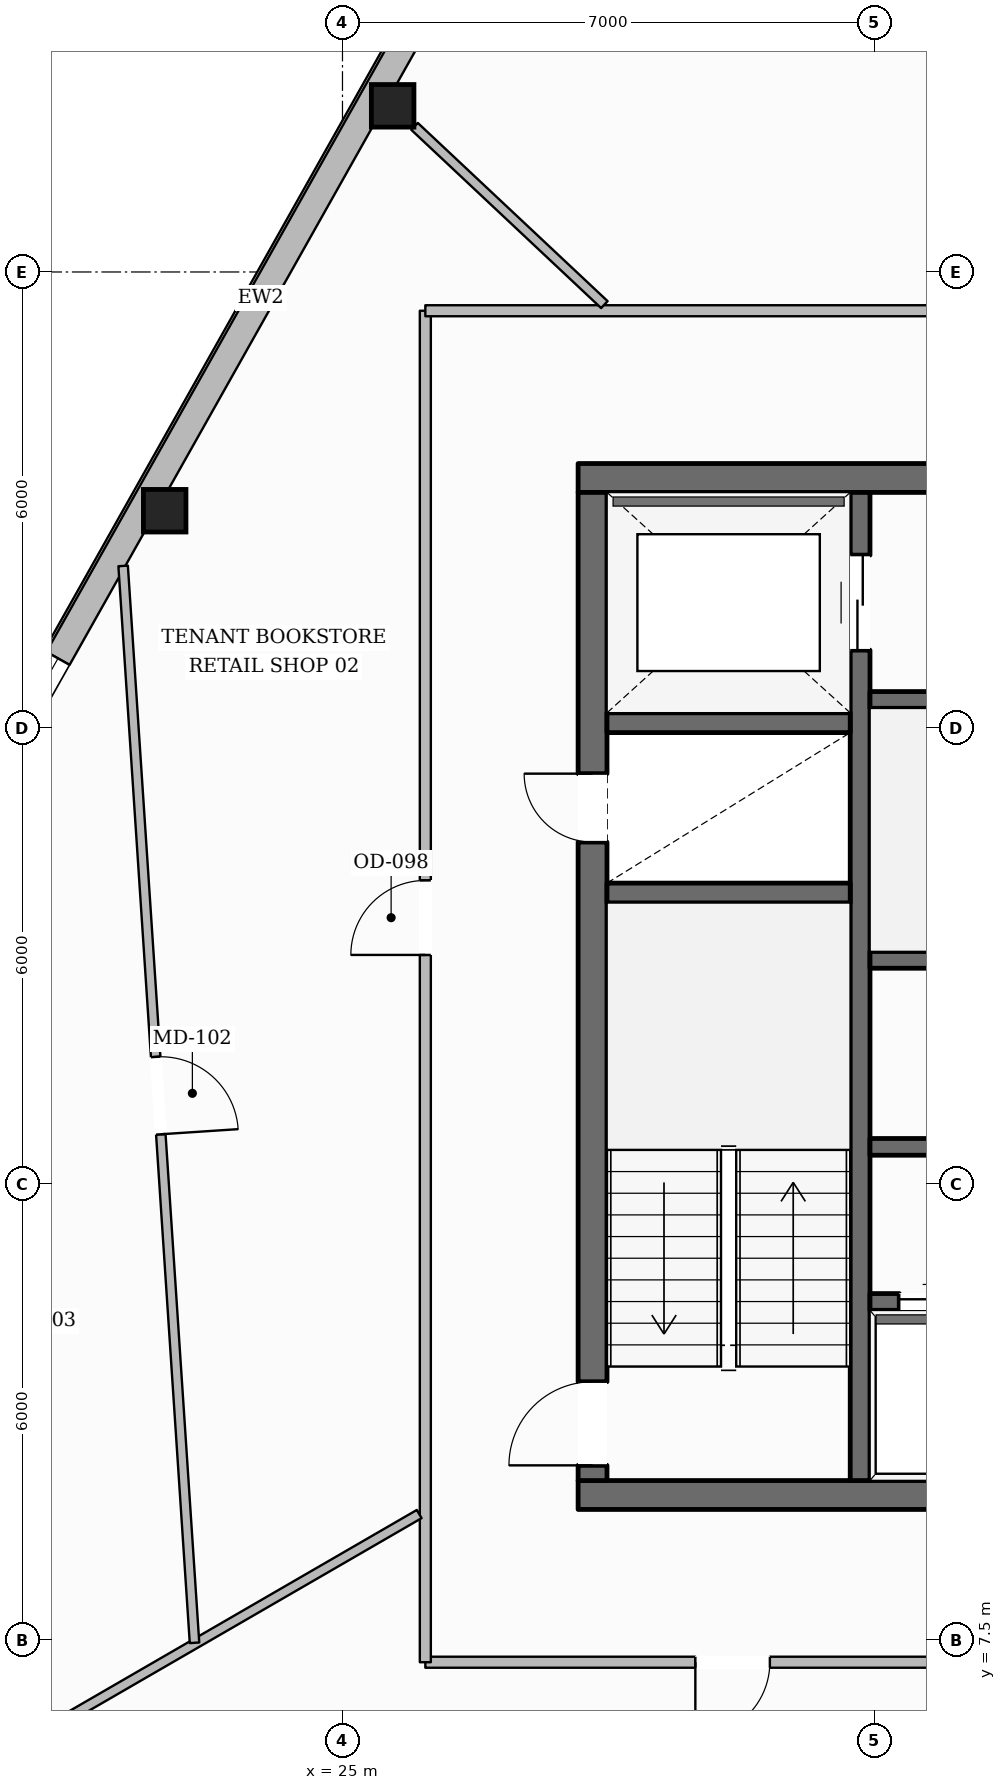
"""IFC4 building model, lengths in metres.
Left out: names, types, materials, properties, quantities, classifications, styles, units other than length and angle.
Written with IfcOpenShell. Run it as: python <this file> out.ifc"""

import sys

from ifc_helpers import new_model, si_unit, direction, frame, frame_2d, origin, origin_2d, place, context, subcontext, project, spatial, rectangle, hollow_rectangle, extrude, element, fill, save


model = new_model("IFC4")
c1 = context("Model", 3, precision=1e-05, world=origin(), true_north=direction((0.0, 1.0)))
c2 = subcontext(c1, "Body", "Model", "MODEL_VIEW")
j1 = project(units=[si_unit("LENGTHUNIT", "METRE"), si_unit("PLANEANGLEUNIT", "RADIAN")], contexts=[c1])
p1 = place(None, origin())
s1 = spatial("IfcSite", under=j1, at=p1, CompositionType="ELEMENT")
p2 = place(p1, origin())
s2 = spatial("IfcBuilding", under=s1, at=p2, CompositionType="ELEMENT")
p3 = place(p2, frame((0.0, 0.0, 239.5)))
s3 = spatial("IfcBuildingStorey", under=s2, at=p3, CompositionType="ELEMENT", Elevation=239.5)
p4 = place(p3, frame((28.1, 9.41, 0.0), z_axis=(0.0, 0.0, 1.0), x_axis=(1.0, 0.0, 0.0)))
e1 = element("IfcWall", 1, at=p4, inside=s3, PredefinedType="SOLIDWALL", context=c2, shape_type="SweptSolid", body=[
    extrude(rectangle(XDim=19.8, YDim=0.38, at=frame_2d((9.9, 0.0))), origin(), (0.0, 0.0, 1.0), 3.61),
])
p5 = place(p4, frame((10.4, 0.0, 0.0)))
e2 = element("IfcOpeningElement", 2, at=p5, cuts=e1, PredefinedType="OPENING", context=c2, shape_type="SweptSolid", body=[
    extrude(rectangle(XDim=1.4, YDim=2.2, at=frame_2d((0.7, 1.1))), frame((0.0, 0.2, 0.0), z_axis=(0.0, -1.0, 0.0), x_axis=(1.0, 0.0, 0.0)), (0.0, 0.0, 1.0), 0.4),
])
p6 = place(p3, frame((28.1, 22.79, 0.0), z_axis=(0.0, 0.0, 1.0), x_axis=(1.0, 0.0, 0.0)))
e3 = element("IfcWall", 3, at=p6, inside=s3, PredefinedType="SOLIDWALL", context=c2, shape_type="SweptSolid", body=[
    extrude(rectangle(XDim=19.8, YDim=0.38, at=frame_2d((9.9, 0.0))), origin(), (0.0, 0.0, 1.0), 3.61),
])
p7 = place(p6, frame((6.175, 0.0, 0.0)))
e4 = element("IfcOpeningElement", 4, at=p7, cuts=e3, PredefinedType="OPENING", context=c2, shape_type="SweptSolid", body=[
    extrude(rectangle(XDim=1.05, YDim=2.15, at=frame_2d((0.525, 1.075))), frame((0.0, 0.2, 0.0), z_axis=(0.0, -1.0, 0.0), x_axis=(1.0, 0.0, 0.0)), (0.0, 0.0, 1.0), 0.4),
])
p8 = place(p6, frame((12.575, 0.0, 0.0)))
e5 = element("IfcOpeningElement", 5, at=p8, cuts=e3, PredefinedType="OPENING", context=c2, shape_type="SweptSolid", body=[
    extrude(rectangle(XDim=1.05, YDim=2.15, at=frame_2d((0.525, 1.075))), frame((0.0, 0.2, 0.0), z_axis=(0.0, -1.0, 0.0), x_axis=(1.0, 0.0, 0.0)), (0.0, 0.0, 1.0), 0.4),
])
p9 = place(p3, frame((28.29, 9.6, 0.0), z_axis=(0.0, 0.0, 1.0), x_axis=(0.0, 1.0, 0.0)))
e6 = element("IfcWall", 6, at=p9, inside=s3, PredefinedType="SOLIDWALL", context=c2, shape_type="SweptSolid", body=[
    extrude(rectangle(XDim=13.0, YDim=0.38, at=frame_2d((6.5, 0.0))), origin(), (0.0, 0.0, 1.0), 3.61),
])
p10 = place(p9, frame((0.2, 0.0, 0.0)))
e7 = element("IfcOpeningElement", 7, at=p10, cuts=e6, PredefinedType="OPENING", context=c2, shape_type="SweptSolid", body=[
    extrude(rectangle(XDim=1.1, YDim=2.15, at=frame_2d((0.55, 1.075))), frame((0.0, 0.2, 0.0), z_axis=(0.0, -1.0, 0.0), x_axis=(1.0, 0.0, 0.0)), (0.0, 0.0, 1.0), 0.4),
])
p11 = place(p9, frame((8.4, 0.0, 0.0)))
e8 = element("IfcOpeningElement", 8, at=p11, cuts=e6, PredefinedType="OPENING", context=c2, shape_type="SweptSolid", body=[
    extrude(rectangle(XDim=0.9, YDim=2.1, at=frame_2d((0.45, 1.05))), frame((0.0, 0.2, 0.0), z_axis=(0.0, -1.0, 0.0), x_axis=(1.0, 0.0, 0.0)), (0.0, 0.0, 1.0), 0.4),
])
p12 = place(p3, frame((31.81, 9.6, 0.0), z_axis=(0.0, 0.0, 1.0), x_axis=(0.0, 1.0, 0.0)))
e9 = element("IfcWall", 9, at=p12, inside=s3, PredefinedType="SHEAR", context=c2, shape_type="SweptSolid", body=[
    extrude(rectangle(XDim=13.0, YDim=0.26, at=frame_2d((6.5, 0.0))), origin(), (0.0, 0.0, 1.0), 3.61),
])
p13 = place(p12, frame((10.925, 0.0, 0.0)))
e10 = element("IfcOpeningElement", 10, at=p13, cuts=e9, PredefinedType="OPENING", context=c2, shape_type="SweptSolid", body=[
    extrude(rectangle(XDim=1.25, YDim=2.25, at=frame_2d((0.625, 1.125))), frame((0.0, 0.14, 0.0), z_axis=(0.0, -1.0, 0.0), x_axis=(1.0, 0.0, 0.0)), (0.0, 0.0, 1.0), 0.28),
])
for number, where, z_axis, x_axis in (
    (11, (28.48, 17.33, 0.0), (0.0, 0.0, 1.0), (1.0, 0.0, 0.0)),
    (12, (28.48, 19.57, 0.0), (0.0, 0.0, 1.0), (1.0, 0.0, 0.0)),
):
    element("IfcWall", number, at=place(p3, frame(where, z_axis=z_axis, x_axis=x_axis)), inside=s3, PredefinedType="SHEAR", context=c2, shape_type="SweptSolid", body=[
        extrude(rectangle(XDim=3.2, YDim=0.26, at=frame_2d((1.6, 0.0))), origin(), (0.0, 0.0, 1.0), 3.61),
    ])
p14 = place(p3, frame((31.94, 19.87, 0.0), z_axis=(0.0, 0.0, 1.0), x_axis=(1.0, 0.0, 0.0)))
e13 = element("IfcWall", 13, at=p14, inside=s3, PredefinedType="SOLIDWALL", context=c2, shape_type="SweptSolid", body=[
    extrude(rectangle(XDim=12.12, YDim=0.22, at=frame_2d((6.06, 0.0))), origin(), (0.0, 0.0, 1.0), 3.61),
])
p15 = place(p14, frame((6.3, 0.0, 0.0)))
e14 = element("IfcOpeningElement", 14, at=p15, cuts=e13, PredefinedType="OPENING", context=c2, shape_type="SweptSolid", body=[
    extrude(rectangle(XDim=1.1, YDim=2.15, at=frame_2d((0.55, 1.075))), frame((0.0, 0.12, 0.0), z_axis=(0.0, -1.0, 0.0), x_axis=(1.0, 0.0, 0.0)), (0.0, 0.0, 1.0), 0.24),
])
p16 = place(p14, frame((8.01, 0.0, 0.0)))
e15 = element("IfcOpeningElement", 15, at=p16, cuts=e13, PredefinedType="OPENING", context=c2, shape_type="SweptSolid", body=[
    extrude(rectangle(XDim=0.9, YDim=2.1, at=frame_2d((0.45, 1.05))), frame((0.0, 0.12, 0.0), z_axis=(0.0, -1.0, 0.0), x_axis=(1.0, 0.0, 0.0)), (0.0, 0.0, 1.0), 0.24),
])
p17 = place(p14, frame((10.21, 0.0, 0.0)))
e16 = element("IfcOpeningElement", 16, at=p17, cuts=e13, PredefinedType="OPENING", context=c2, shape_type="SweptSolid", body=[
    extrude(rectangle(XDim=0.9, YDim=2.1, at=frame_2d((0.45, 1.05))), frame((0.0, 0.12, 0.0), z_axis=(0.0, -1.0, 0.0), x_axis=(1.0, 0.0, 0.0)), (0.0, 0.0, 1.0), 0.24),
])
p18 = place(p3, frame((31.94, 16.45, 0.0), z_axis=(0.0, 0.0, 1.0), x_axis=(1.0, 0.0, 0.0)))
e17 = element("IfcWall", 17, at=p18, inside=s3, PredefinedType="SOLIDWALL", context=c2, shape_type="SweptSolid", body=[
    extrude(rectangle(XDim=12.12, YDim=0.22, at=frame_2d((6.06, 0.0))), origin(), (0.0, 0.0, 1.0), 3.61),
])
p19 = place(p3, frame((31.94, 13.99, 0.0), z_axis=(0.0, 0.0, 1.0), x_axis=(1.0, 0.0, 0.0)))
e18 = element("IfcWall", 18, at=p19, inside=s3, PredefinedType="SOLIDWALL", context=c2, shape_type="SweptSolid", body=[
    extrude(rectangle(XDim=12.12, YDim=0.22, at=frame_2d((6.06, 0.0))), origin(), (0.0, 0.0, 1.0), 3.61),
])
p20 = place(p19, frame((1.91, 0.0, 0.0)))
e19 = element("IfcOpeningElement", 19, at=p20, cuts=e18, PredefinedType="OPENING", context=c2, shape_type="SweptSolid", body=[
    extrude(rectangle(XDim=0.9, YDim=2.1, at=frame_2d((0.45, 1.05))), frame((0.0, 0.12, 0.0), z_axis=(0.0, -1.0, 0.0), x_axis=(1.0, 0.0, 0.0)), (0.0, 0.0, 1.0), 0.24),
])
p21 = place(p19, frame((7.95, 0.0, 0.0)))
e20 = element("IfcOpeningElement", 20, at=p21, cuts=e18, PredefinedType="OPENING", context=c2, shape_type="SweptSolid", body=[
    extrude(rectangle(XDim=1.02, YDim=2.15, at=frame_2d((0.51, 1.075))), frame((0.0, 0.12, 0.0), z_axis=(0.0, -1.0, 0.0), x_axis=(1.0, 0.0, 0.0)), (0.0, 0.0, 1.0), 0.24),
])
p22 = place(p3, frame((31.94, 11.95, 0.0), z_axis=(0.0, 0.0, 1.0), x_axis=(1.0, 0.0, 0.0)))
e21 = element("IfcWall", 21, at=p22, inside=s3, PredefinedType="SOLIDWALL", context=c2, shape_type="SweptSolid", body=[
    extrude(rectangle(XDim=6.19, YDim=0.22, at=frame_2d((3.095, 0.0))), origin(), (0.0, 0.0, 1.0), 3.61),
])
p23 = place(p22, frame((0.385, 0.0, 0.0)))
e22 = element("IfcOpeningElement", 22, at=p23, cuts=e21, PredefinedType="OPENING", context=c2, shape_type="SweptSolid", body=[
    extrude(rectangle(XDim=1.1, YDim=2.2, at=frame_2d((0.55, 1.1))), frame((0.0, 0.12, 0.0), z_axis=(0.0, -1.0, 0.0), x_axis=(1.0, 0.0, 0.0)), (0.0, 0.0, 1.0), 0.24),
])
p24 = place(p22, frame((2.435, 0.0, 0.0)))
e23 = element("IfcOpeningElement", 23, at=p24, cuts=e21, PredefinedType="OPENING", context=c2, shape_type="SweptSolid", body=[
    extrude(rectangle(XDim=1.1, YDim=2.2, at=frame_2d((0.55, 1.1))), frame((0.0, 0.12, 0.0), z_axis=(0.0, -1.0, 0.0), x_axis=(1.0, 0.0, 0.0)), (0.0, 0.0, 1.0), 0.24),
])
p25 = place(p22, frame((4.485, 0.0, 0.0)))
e24 = element("IfcOpeningElement", 24, at=p25, cuts=e21, PredefinedType="OPENING", context=c2, shape_type="SweptSolid", body=[
    extrude(rectangle(XDim=1.1, YDim=2.2, at=frame_2d((0.55, 1.1))), frame((0.0, 0.12, 0.0), z_axis=(0.0, -1.0, 0.0), x_axis=(1.0, 0.0, 0.0)), (0.0, 0.0, 1.0), 0.24),
])
for number, where, z_axis, x_axis in (
    (25, (25.66, 27.686, 0.0), (0.0, 0.0, 1.0), (1.0, 0.0, 0.0)),
    (26, (22.661, 22.359, 0.0), (0.0, 0.0, 1.0), (1.0, 0.0, 0.0)),
):
    element("IfcColumn", number, at=place(p3, frame(where, z_axis=z_axis, x_axis=x_axis)), inside=s3, PredefinedType="COLUMN", context=c2, shape_type="SweptSolid", body=[
        extrude(hollow_rectangle(XDim=0.56, YDim=0.56, WallThickness=0.025, at=origin_2d()), origin(), (0.0, 0.0, 1.0), 3.61),
    ])
p26 = place(p3, frame((16.196, 11.427, 0.0), z_axis=(0.0, 0.0, 1.0), x_axis=(0.490622807514, 0.871372056442, 0.0)))
e27 = element("IfcWall", 27, at=p26, inside=s3, PredefinedType="STANDARD", context=c2, shape_type="SweptSolid", body=[
    extrude(rectangle(XDim=37.632, YDim=0.35, at=frame_2d((18.816, 0.0))), origin(), (0.0, 0.0, 1.0), 3.196),
])
p27 = place(p26, frame((27.624, 0.0, 0.0)))
e28 = element("IfcOpeningElement", 28, at=p27, cuts=e27, PredefinedType="OPENING", context=c2, shape_type="SweptSolid", body=[
    extrude(rectangle(XDim=1.0, YDim=2.2, at=frame_2d((0.5, 1.1))), frame((0.0, 0.185, 0.0), z_axis=(0.0, -1.0, 0.0), x_axis=(1.0, 0.0, 0.0)), (0.0, 0.0, 1.0), 0.37),
])
p28 = place(p26, frame((33.418, 0.0, 0.65)))
e29 = element("IfcOpeningElement", 29, at=p28, cuts=e27, PredefinedType="OPENING", context=c2, shape_type="SweptSolid", body=[
    extrude(rectangle(XDim=1.35, YDim=1.75, at=frame_2d((0.675, 0.875))), frame((0.0, 0.185, 0.0), z_axis=(0.0, -1.0, 0.0), x_axis=(1.0, 0.0, 0.0)), (0.0, 0.0, 1.0), 0.37),
])
p29 = place(p26, frame((21.192, 0.0, 0.65)))
e30 = element("IfcOpeningElement", 30, at=p29, cuts=e27, PredefinedType="OPENING", context=c2, shape_type="SweptSolid", body=[
    extrude(rectangle(XDim=1.35, YDim=1.75, at=frame_2d((0.675, 0.875))), frame((0.0, 0.185, 0.0), z_axis=(0.0, -1.0, 0.0), x_axis=(1.0, 0.0, 0.0)), (0.0, 0.0, 1.0), 0.37),
])
p30 = place(p26, frame((8.966, 0.0, 0.65)))
e31 = element("IfcOpeningElement", 31, at=p30, cuts=e27, PredefinedType="OPENING", context=c2, shape_type="SweptSolid", body=[
    extrude(rectangle(XDim=1.35, YDim=1.75, at=frame_2d((0.675, 0.875))), frame((0.0, 0.185, 0.0), z_axis=(0.0, -1.0, 0.0), x_axis=(1.0, 0.0, 0.0)), (0.0, 0.0, 1.0), 0.37),
])
p31 = place(p26, frame((2.853, 0.0, 0.65)))
e32 = element("IfcOpeningElement", 32, at=p31, cuts=e27, PredefinedType="OPENING", context=c2, shape_type="SweptSolid", body=[
    extrude(rectangle(XDim=1.35, YDim=1.75, at=frame_2d((0.675, 0.875))), frame((0.0, 0.185, 0.0), z_axis=(0.0, -1.0, 0.0), x_axis=(1.0, 0.0, 0.0)), (0.0, 0.0, 1.0), 0.37),
])
p32 = place(p3, frame((49.91, 7.21, 0.0), z_axis=(0.0, 0.0, 1.0), x_axis=(-1.0, 0.0, 0.0)))
e33 = element("IfcWall", 33, at=p32, inside=s3, PredefinedType="PARTITIONING", context=c2, shape_type="SweptSolid", body=[
    extrude(rectangle(XDim=23.82, YDim=0.145, at=frame_2d((11.91, 0.0))), origin(), (0.0, 0.0, 1.0), 3.61),
])
p33 = place(p32, frame((11.781, 0.0, 0.0)))
e34 = element("IfcOpeningElement", 34, at=p33, cuts=e33, PredefinedType="OPENING", context=c2, shape_type="SweptSolid", body=[
    extrude(rectangle(XDim=0.98, YDim=2.15, at=frame_2d((0.49, 1.075))), frame((0.0, 0.083, 0.0), z_axis=(0.0, -1.0, 0.0), x_axis=(1.0, 0.0, 0.0)), (0.0, 0.0, 1.0), 0.165),
])
p34 = place(p32, frame((19.288, 0.0, 0.0)))
e35 = element("IfcOpeningElement", 35, at=p34, cuts=e33, PredefinedType="OPENING", context=c2, shape_type="SweptSolid", body=[
    extrude(rectangle(XDim=0.98, YDim=2.15, at=frame_2d((0.49, 1.075))), frame((0.0, 0.083, 0.0), z_axis=(0.0, -1.0, 0.0), x_axis=(1.0, 0.0, 0.0)), (0.0, 0.0, 1.0), 0.165),
])
p35 = place(p32, frame((2.473, 0.0, 0.0)))
e36 = element("IfcOpeningElement", 36, at=p35, cuts=e33, PredefinedType="OPENING", context=c2, shape_type="SweptSolid", body=[
    extrude(rectangle(XDim=1.4, YDim=2.2, at=frame_2d((0.7, 1.1))), frame((0.0, 0.083, 0.0), z_axis=(0.0, -1.0, 0.0), x_axis=(1.0, 0.0, 0.0)), (0.0, 0.0, 1.0), 0.165),
])
p36 = place(p3, frame((26.09, 7.21, 0.0), z_axis=(0.0, 0.0, 1.0), x_axis=(0.0, 1.0, 0.0)))
e37 = element("IfcWall", 37, at=p36, inside=s3, PredefinedType="PARTITIONING", context=c2, shape_type="SweptSolid", body=[
    extrude(rectangle(XDim=17.78, YDim=0.145, at=frame_2d((8.89, 0.0))), origin(), (0.0, 0.0, 1.0), 3.349),
])
p37 = place(p36, frame((9.305, 0.0, 0.0)))
e38 = element("IfcOpeningElement", 38, at=p37, cuts=e37, PredefinedType="OPENING", context=c2, shape_type="SweptSolid", body=[
    extrude(rectangle(XDim=0.98, YDim=2.15, at=frame_2d((0.49, 1.075))), frame((0.0, 0.083, 0.0), z_axis=(0.0, -1.0, 0.0), x_axis=(1.0, 0.0, 0.0)), (0.0, 0.0, 1.0), 0.165),
])
p38 = place(p3, frame((26.09, 24.99, 0.0), z_axis=(0.0, 0.0, 1.0), x_axis=(1.0, 0.0, 0.0)))
e39 = element("IfcWall", 39, at=p38, inside=s3, PredefinedType="PARTITIONING", context=c2, shape_type="SweptSolid", body=[
    extrude(rectangle(XDim=17.11, YDim=0.145, at=frame_2d((8.555, 0.0))), origin(), (0.0, 0.0, 1.0), 3.61),
])
p39 = place(p38, frame((8.47, 0.0, 0.0)))
e40 = element("IfcOpeningElement", 40, at=p39, cuts=e39, PredefinedType="OPENING", context=c2, shape_type="SweptSolid", body=[
    extrude(rectangle(XDim=0.88, YDim=2.1, at=frame_2d((0.44, 1.05))), frame((0.0, 0.083, 0.0), z_axis=(0.0, -1.0, 0.0), x_axis=(1.0, 0.0, 0.0)), (0.0, 0.0, 1.0), 0.165),
])
p40 = place(p38, frame((10.99, 0.0, 0.0)))
e41 = element("IfcOpeningElement", 41, at=p40, cuts=e39, PredefinedType="OPENING", context=c2, shape_type="SweptSolid", body=[
    extrude(rectangle(XDim=0.88, YDim=2.1, at=frame_2d((0.44, 1.05))), frame((0.0, 0.083, 0.0), z_axis=(0.0, -1.0, 0.0), x_axis=(1.0, 0.0, 0.0)), (0.0, 0.0, 1.0), 0.165),
])
p41 = place(p38, frame((13.37, 0.0, 0.0)))
e42 = element("IfcOpeningElement", 42, at=p41, cuts=e39, PredefinedType="OPENING", context=c2, shape_type="SweptSolid", body=[
    extrude(rectangle(XDim=0.96, YDim=2.1, at=frame_2d((0.48, 1.05))), frame((0.0, 0.083, 0.0), z_axis=(0.0, -1.0, 0.0), x_axis=(1.0, 0.0, 0.0)), (0.0, 0.0, 1.0), 0.165),
])
p42 = place(p3, frame((28.446, 25.071, 0.0), z_axis=(0.0, 0.0, 1.0), x_axis=(-0.729059244578, 0.684450595657, 0.0)))
e43 = element("IfcWall", 43, at=p42, inside=s3, PredefinedType="PARTITIONING", context=c2, shape_type="SweptSolid", body=[
    extrude(rectangle(XDim=3.426, YDim=0.125, at=frame_2d((1.713, 0.0))), origin(), (0.0, 0.0, 1.0), 3.61),
])
p43 = place(p3, frame((26.01, 9.159, 0.0), z_axis=(0.0, 0.0, 1.0), x_axis=(-0.865468767554, -0.500962885241, 0.0)))
e44 = element("IfcWall", 44, at=p43, inside=s3, PredefinedType="PARTITIONING", context=c2, shape_type="SweptSolid", body=[
    extrude(rectangle(XDim=6.557, YDim=0.125, at=frame_2d((3.279, 0.0))), origin(), (0.0, 0.0, 1.0), 3.246),
])
p44 = place(p3, frame((22.114, 21.633, 0.0), z_axis=(0.0, 0.0, 1.0), x_axis=(0.06614923697, -0.997809740606, 0.0)))
e45 = element("IfcWall", 45, at=p44, inside=s3, PredefinedType="PARTITIONING", context=c2, shape_type="SweptSolid", body=[
    extrude(rectangle(XDim=14.198, YDim=0.125, at=frame_2d((7.099, 0.0))), origin(), (0.0, 0.0, 1.0), 3.349),
])
p45 = place(p44, frame((6.473, 0.0, 0.0)))
e46 = element("IfcOpeningElement", 46, at=p45, cuts=e45, PredefinedType="OPENING", context=c2, shape_type="SweptSolid", body=[
    extrude(rectangle(XDim=1.02, YDim=2.15, at=frame_2d((0.51, 1.075))), frame((0.0, 0.073, 0.0), z_axis=(0.0, -1.0, 0.0), x_axis=(1.0, 0.0, 0.0)), (0.0, 0.0, 1.0), 0.145),
])
p46 = place(p30, origin())
e47 = element("IfcWindow", 47, at=p46, inside=s3, PartitioningType="SINGLE_PANEL", PredefinedType="WINDOW", context=c2, shape_type="SweptSolid", body=[
    extrude(rectangle(XDim=1.35, YDim=1.75, at=frame_2d((0.675, 0.875))), frame((0.0, 0.03, 0.0), z_axis=(0.0, -1.0, 0.0), x_axis=(1.0, 0.0, 0.0)), (0.0, 0.0, 1.0), 0.06),
])
fill(e31, e47)
p47 = place(p10, origin())
e48 = element("IfcDoor", 48, at=p47, inside=s3, OperationType="SINGLE_SWING_LEFT", PredefinedType="DOOR", context=c2, shape_type="SweptSolid", body=[
    extrude(rectangle(XDim=1.1, YDim=2.15, at=frame_2d((0.55, 1.075))), frame((0.0, 0.025, 0.0), z_axis=(0.0, -1.0, 0.0), x_axis=(1.0, 0.0, 0.0)), (0.0, 0.0, 1.0), 0.05),
])
fill(e7, e48)
p48 = place(p11, origin())
e49 = element("IfcDoor", 49, at=p48, inside=s3, OperationType="SINGLE_SWING_RIGHT", PredefinedType="DOOR", context=c2, shape_type="SweptSolid", body=[
    extrude(rectangle(XDim=0.9, YDim=2.1, at=frame_2d((0.45, 1.05))), frame((0.0, 0.025, 0.0), z_axis=(0.0, -1.0, 0.0), x_axis=(1.0, 0.0, 0.0)), (0.0, 0.0, 1.0), 0.05),
])
fill(e8, e49)
p49 = place(p13, origin())
e50 = element("IfcDoor", 50, at=p49, inside=s3, OperationType="DOUBLE_DOOR_SLIDING", PredefinedType="DOOR", context=c2, shape_type="SweptSolid", body=[
    extrude(rectangle(XDim=1.25, YDim=2.25, at=frame_2d((0.625, 1.125))), frame((0.0, 0.025, 0.0), z_axis=(0.0, -1.0, 0.0), x_axis=(1.0, 0.0, 0.0)), (0.0, 0.0, 1.0), 0.05),
])
fill(e10, e50)
p50 = place(p23, origin())
e51 = element("IfcDoor", 51, at=p50, inside=s3, OperationType="DOUBLE_DOOR_SLIDING", PredefinedType="DOOR", context=c2, shape_type="SweptSolid", body=[
    extrude(rectangle(XDim=1.1, YDim=2.2, at=frame_2d((0.55, 1.1))), frame((0.0, 0.025, 0.0), z_axis=(0.0, -1.0, 0.0), x_axis=(1.0, 0.0, 0.0)), (0.0, 0.0, 1.0), 0.05),
])
fill(e22, e51)
p51 = place(p37, origin())
e52 = element("IfcDoor", 52, at=p51, inside=s3, OperationType="SINGLE_SWING_LEFT", PredefinedType="DOOR", context=c2, shape_type="SweptSolid", body=[
    extrude(rectangle(XDim=0.98, YDim=2.15, at=frame_2d((0.49, 1.075))), frame((0.0, 0.025, 0.0), z_axis=(0.0, -1.0, 0.0), x_axis=(1.0, 0.0, 0.0)), (0.0, 0.0, 1.0), 0.05),
])
fill(e38, e52)
p52 = place(p45, origin())
e53 = element("IfcDoor", 53, at=p52, inside=s3, OperationType="SINGLE_SWING_RIGHT", PredefinedType="DOOR", context=c2, shape_type="SweptSolid", body=[
    extrude(rectangle(XDim=1.02, YDim=2.15, at=frame_2d((0.51, 1.075))), frame((0.0, 0.025, 0.0), z_axis=(0.0, -1.0, 0.0), x_axis=(1.0, 0.0, 0.0)), (0.0, 0.0, 1.0), 0.05),
])
fill(e46, e53)
p53 = place(p34, origin())
e54 = element("IfcDoor", 54, at=p53, inside=s3, OperationType="SINGLE_SWING_RIGHT", PredefinedType="DOOR", context=c2, shape_type="SweptSolid", body=[
    extrude(rectangle(XDim=0.98, YDim=2.15, at=frame_2d((0.49, 1.075))), frame((0.0, 0.025, 0.0), z_axis=(0.0, -1.0, 0.0), x_axis=(1.0, 0.0, 0.0)), (0.0, 0.0, 1.0), 0.05),
])
fill(e35, e54)
save(model, sys.argv[1])
